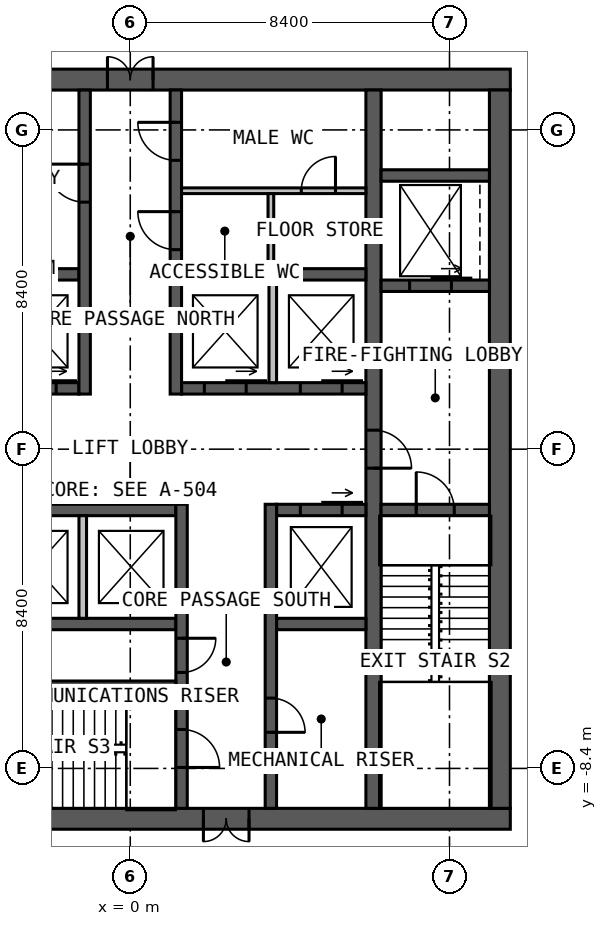
"""IFC4 building model, lengths in metres.
Left out: names, types, materials, properties, quantities, classifications, styles, units other than length and angle.
Written with IfcOpenShell. Run it as: python <this file> out.ifc"""

import sys

from ifc_helpers import new_model, si_unit, direction, frame, frame_2d, origin, place, context, subcontext, project, spatial, rectangle, extrude, element, fill, save


model = new_model("IFC4")
c1 = context("Model", 3, precision=1e-05, world=origin(), true_north=direction((0.0, 1.0)))
c2 = subcontext(c1, "Body", "Model", "MODEL_VIEW")
j1 = project(units=[si_unit("LENGTHUNIT", "METRE"), si_unit("PLANEANGLEUNIT", "RADIAN")], contexts=[c1])
p1 = place(None, origin())
s1 = spatial("IfcSite", under=j1, at=p1, CompositionType="ELEMENT")
p2 = place(p1, origin())
s2 = spatial("IfcBuilding", under=s1, at=p2, CompositionType="ELEMENT")
p3 = place(p2, frame((0.0, 0.0, 146.0)))
s3 = spatial("IfcBuildingStorey", under=s2, at=p3, CompositionType="ELEMENT", Elevation=146.0)
p4 = place(p3, frame((-10.0, 9.725, 0.0), z_axis=(0.0, 0.0, 1.0), x_axis=(1.0, 0.0, 0.0)))
e1 = element("IfcWall", 1, at=p4, inside=s3, PredefinedType="SOLIDWALL", context=c2, shape_type="SweptSolid", body=[
    extrude(rectangle(XDim=20.0, YDim=0.55, at=frame_2d((10.0, 0.0))), origin(), (0.0, 0.0, 1.0), 4.0),
])
p5 = place(p4, frame((9.4, 0.0, 0.0)))
e2 = element("IfcOpeningElement", 2, at=p5, cuts=e1, PredefinedType="OPENING", context=c2, shape_type="SweptSolid", body=[
    extrude(rectangle(XDim=1.2, YDim=2.2, at=frame_2d((0.6, 1.1))), frame((0.0, 0.285, 0.0), z_axis=(0.0, -1.0, 0.0), x_axis=(1.0, 0.0, 0.0)), (0.0, 0.0, 1.0), 0.57),
])
p6 = place(p3, frame((10.0, -9.725, 0.0), z_axis=(0.0, 0.0, 1.0), x_axis=(-1.0, 0.0, 0.0)))
e3 = element("IfcWall", 3, at=p6, inside=s3, PredefinedType="SOLIDWALL", context=c2, shape_type="SweptSolid", body=[
    extrude(rectangle(XDim=20.0, YDim=0.55, at=frame_2d((10.0, 0.0))), origin(), (0.0, 0.0, 1.0), 4.0),
])
p7 = place(p6, frame((6.875, 0.0, 0.0)))
e4 = element("IfcOpeningElement", 4, at=p7, cuts=e3, PredefinedType="OPENING", context=c2, shape_type="SweptSolid", body=[
    extrude(rectangle(XDim=1.2, YDim=2.2, at=frame_2d((0.6, 1.1))), frame((0.0, 0.285, 0.0), z_axis=(0.0, -1.0, 0.0), x_axis=(1.0, 0.0, 0.0)), (0.0, 0.0, 1.0), 0.57),
])
p8 = place(p3, frame((9.725, -9.45, 0.0), z_axis=(0.0, 0.0, 1.0), x_axis=(0.0, 1.0, 0.0)))
e5 = element("IfcWall", 5, at=p8, inside=s3, PredefinedType="SOLIDWALL", context=c2, shape_type="SweptSolid", body=[
    extrude(rectangle(XDim=18.9, YDim=0.55, at=frame_2d((9.45, 0.0))), origin(), (0.0, 0.0, 1.0), 4.0),
])
p9 = place(p3, frame((6.4, 9.45, 0.0), z_axis=(0.0, 0.0, 1.0), x_axis=(0.0, -1.0, 0.0)))
e6 = element("IfcWall", 6, at=p9, inside=s3, PredefinedType="SOLIDWALL", context=c2, shape_type="SweptSolid", body=[
    extrude(rectangle(XDim=18.9, YDim=0.4, at=frame_2d((9.45, 0.0))), origin(), (0.0, 0.0, 1.0), 4.0),
])
p10 = place(p9, frame((8.95, 0.0, 0.0)))
e7 = element("IfcOpeningElement", 7, at=p10, cuts=e6, PredefinedType="OPENING", context=c2, shape_type="SweptSolid", body=[
    extrude(rectangle(XDim=1.0, YDim=2.2, at=frame_2d((0.5, 1.1))), frame((0.0, 0.21, 0.0), z_axis=(0.0, -1.0, 0.0), x_axis=(1.0, 0.0, 0.0)), (0.0, 0.0, 1.0), 0.42),
])
p11 = place(p3, frame((-6.2, 1.6, 0.0), z_axis=(0.0, 0.0, 1.0), x_axis=(1.0, 0.0, 0.0)))
e8 = element("IfcWall", 8, at=p11, inside=s3, PredefinedType="SOLIDWALL", context=c2, shape_type="SweptSolid", body=[
    extrude(rectangle(XDim=4.85, YDim=0.3, at=frame_2d((2.425, 0.0))), origin(), (0.0, 0.0, 1.0), 4.0),
])
p12 = place(p11, frame((0.625, 0.0, 0.0)))
e9 = element("IfcOpeningElement", 9, at=p12, cuts=e8, PredefinedType="OPENING", context=c2, shape_type="SweptSolid", body=[
    extrude(rectangle(XDim=1.1, YDim=2.2, at=frame_2d((0.55, 1.1))), frame((0.0, 0.16, 0.0), z_axis=(0.0, -1.0, 0.0), x_axis=(1.0, 0.0, 0.0)), (0.0, 0.0, 1.0), 0.32),
])
p13 = place(p11, frame((3.15, 0.0, 0.0)))
e10 = element("IfcOpeningElement", 10, at=p13, cuts=e8, PredefinedType="OPENING", context=c2, shape_type="SweptSolid", body=[
    extrude(rectangle(XDim=1.1, YDim=2.2, at=frame_2d((0.55, 1.1))), frame((0.0, 0.16, 0.0), z_axis=(0.0, -1.0, 0.0), x_axis=(1.0, 0.0, 0.0)), (0.0, 0.0, 1.0), 0.32),
])
p14 = place(p3, frame((1.35, 1.6, 0.0), z_axis=(0.0, 0.0, 1.0), x_axis=(1.0, 0.0, 0.0)))
e11 = element("IfcWall", 11, at=p14, inside=s3, PredefinedType="SOLIDWALL", context=c2, shape_type="SweptSolid", body=[
    extrude(rectangle(XDim=4.85, YDim=0.3, at=frame_2d((2.425, 0.0))), origin(), (0.0, 0.0, 1.0), 4.0),
])
p15 = place(p14, frame((0.6, 0.0, 0.0)))
e12 = element("IfcOpeningElement", 12, at=p15, cuts=e11, PredefinedType="OPENING", context=c2, shape_type="SweptSolid", body=[
    extrude(rectangle(XDim=1.1, YDim=2.2, at=frame_2d((0.55, 1.1))), frame((0.0, 0.16, 0.0), z_axis=(0.0, -1.0, 0.0), x_axis=(1.0, 0.0, 0.0)), (0.0, 0.0, 1.0), 0.32),
])
p16 = place(p14, frame((3.125, 0.0, 0.0)))
e13 = element("IfcOpeningElement", 13, at=p16, cuts=e11, PredefinedType="OPENING", context=c2, shape_type="SweptSolid", body=[
    extrude(rectangle(XDim=1.1, YDim=2.2, at=frame_2d((0.55, 1.1))), frame((0.0, 0.16, 0.0), z_axis=(0.0, -1.0, 0.0), x_axis=(1.0, 0.0, 0.0)), (0.0, 0.0, 1.0), 0.32),
])
for number, where, z_axis, x_axis in (
    (14, (-6.2, 4.6, 0.0), (0.0, 0.0, 1.0), (1.0, 0.0, 0.0)),
    (15, (1.35, 4.6, 0.0), (0.0, 0.0, 1.0), (1.0, 0.0, 0.0)),
):
    element("IfcWall", number, at=place(p3, frame(where, z_axis=z_axis, x_axis=x_axis)), inside=s3, PredefinedType="SOLIDWALL", context=c2, shape_type="SweptSolid", body=[
        extrude(rectangle(XDim=4.85, YDim=0.3, at=frame_2d((2.425, 0.0))), origin(), (0.0, 0.0, 1.0), 4.0),
    ])
p17 = place(p3, frame((-1.2, 1.45, 0.0), z_axis=(0.0, 0.0, 1.0), x_axis=(0.0, 1.0, 0.0)))
e16 = element("IfcWall", 16, at=p17, inside=s3, PredefinedType="SOLIDWALL", context=c2, shape_type="SweptSolid", body=[
    extrude(rectangle(XDim=8.0, YDim=0.3, at=frame_2d((4.0, 0.0))), origin(), (0.0, 0.0, 1.0), 4.0),
])
p18 = place(p17, frame((5.05, 0.0, 0.0)))
e17 = element("IfcOpeningElement", 17, at=p18, cuts=e16, PredefinedType="OPENING", context=c2, shape_type="SweptSolid", body=[
    extrude(rectangle(XDim=1.0, YDim=2.2, at=frame_2d((0.5, 1.1))), frame((0.0, 0.16, 0.0), z_axis=(0.0, -1.0, 0.0), x_axis=(1.0, 0.0, 0.0)), (0.0, 0.0, 1.0), 0.32),
])
p19 = place(p3, frame((1.2, 1.45, 0.0), z_axis=(0.0, 0.0, 1.0), x_axis=(0.0, 1.0, 0.0)))
e18 = element("IfcWall", 18, at=p19, inside=s3, PredefinedType="SOLIDWALL", context=c2, shape_type="SweptSolid", body=[
    extrude(rectangle(XDim=8.0, YDim=0.3, at=frame_2d((4.0, 0.0))), origin(), (0.0, 0.0, 1.0), 4.0),
])
p20 = place(p19, frame((3.8, 0.0, 0.0)))
e19 = element("IfcOpeningElement", 19, at=p20, cuts=e18, PredefinedType="OPENING", context=c2, shape_type="SweptSolid", body=[
    extrude(rectangle(XDim=1.0, YDim=2.2, at=frame_2d((0.5, 1.1))), frame((0.0, 0.16, 0.0), z_axis=(0.0, -1.0, 0.0), x_axis=(1.0, 0.0, 0.0)), (0.0, 0.0, 1.0), 0.32),
])
p21 = place(p19, frame((6.15, 0.0, 0.0)))
e20 = element("IfcOpeningElement", 20, at=p21, cuts=e18, PredefinedType="OPENING", context=c2, shape_type="SweptSolid", body=[
    extrude(rectangle(XDim=1.0, YDim=2.2, at=frame_2d((0.5, 1.1))), frame((0.0, 0.16, 0.0), z_axis=(0.0, -1.0, 0.0), x_axis=(1.0, 0.0, 0.0)), (0.0, 0.0, 1.0), 0.32),
])
p22 = place(p3, frame((-6.2, -1.6, 0.0), z_axis=(0.0, 0.0, 1.0), x_axis=(1.0, 0.0, 0.0)))
e21 = element("IfcWall", 21, at=p22, inside=s3, PredefinedType="SOLIDWALL", context=c2, shape_type="SweptSolid", body=[
    extrude(rectangle(XDim=7.4, YDim=0.3, at=frame_2d((3.7, 0.0))), origin(), (0.0, 0.0, 1.0), 4.0),
])
p23 = place(p3, frame((3.85, -1.6, 0.0), z_axis=(0.0, 0.0, 1.0), x_axis=(1.0, 0.0, 0.0)))
e22 = element("IfcWall", 22, at=p23, inside=s3, PredefinedType="SOLIDWALL", context=c2, shape_type="SweptSolid", body=[
    extrude(rectangle(XDim=2.35, YDim=0.3, at=frame_2d((1.175, 0.0))), origin(), (0.0, 0.0, 1.0), 4.0),
])
p24 = place(p23, frame((0.625, 0.0, 0.0)))
e23 = element("IfcOpeningElement", 23, at=p24, cuts=e22, PredefinedType="OPENING", context=c2, shape_type="SweptSolid", body=[
    extrude(rectangle(XDim=1.1, YDim=2.2, at=frame_2d((0.55, 1.1))), frame((0.0, 0.16, 0.0), z_axis=(0.0, -1.0, 0.0), x_axis=(1.0, 0.0, 0.0)), (0.0, 0.0, 1.0), 0.32),
])
p25 = place(p3, frame((-6.2, -4.6, 0.0), z_axis=(0.0, 0.0, 1.0), x_axis=(1.0, 0.0, 0.0)))
e24 = element("IfcWall", 24, at=p25, inside=s3, PredefinedType="SOLIDWALL", context=c2, shape_type="SweptSolid", body=[
    extrude(rectangle(XDim=7.4, YDim=0.3, at=frame_2d((3.7, 0.0))), origin(), (0.0, 0.0, 1.0), 4.0),
])
p26 = place(p3, frame((3.85, -4.6, 0.0), z_axis=(0.0, 0.0, 1.0), x_axis=(1.0, 0.0, 0.0)))
e25 = element("IfcWall", 25, at=p26, inside=s3, PredefinedType="SOLIDWALL", context=c2, shape_type="SweptSolid", body=[
    extrude(rectangle(XDim=2.35, YDim=0.3, at=frame_2d((1.175, 0.0))), origin(), (0.0, 0.0, 1.0), 4.0),
])
p27 = place(p3, frame((1.35, -1.45, 0.0), z_axis=(0.0, 0.0, 1.0), x_axis=(0.0, -1.0, 0.0)))
e26 = element("IfcWall", 26, at=p27, inside=s3, PredefinedType="SOLIDWALL", context=c2, shape_type="SweptSolid", body=[
    extrude(rectangle(XDim=8.0, YDim=0.3, at=frame_2d((4.0, 0.0))), origin(), (0.0, 0.0, 1.0), 4.0),
])
p28 = place(p27, frame((5.925, 0.0, 0.0)))
e27 = element("IfcOpeningElement", 27, at=p28, cuts=e26, PredefinedType="OPENING", context=c2, shape_type="SweptSolid", body=[
    extrude(rectangle(XDim=1.0, YDim=2.2, at=frame_2d((0.5, 1.1))), frame((0.0, 0.16, 0.0), z_axis=(0.0, -1.0, 0.0), x_axis=(1.0, 0.0, 0.0)), (0.0, 0.0, 1.0), 0.32),
])
p29 = place(p27, frame((3.525, 0.0, 0.0)))
e28 = element("IfcOpeningElement", 28, at=p29, cuts=e26, PredefinedType="OPENING", context=c2, shape_type="SweptSolid", body=[
    extrude(rectangle(XDim=0.9, YDim=2.2, at=frame_2d((0.45, 1.1))), frame((0.0, 0.16, 0.0), z_axis=(0.0, -1.0, 0.0), x_axis=(1.0, 0.0, 0.0)), (0.0, 0.0, 1.0), 0.32),
])
p30 = place(p3, frame((3.7, -1.45, 0.0), z_axis=(0.0, 0.0, 1.0), x_axis=(0.0, -1.0, 0.0)))
e29 = element("IfcWall", 29, at=p30, inside=s3, PredefinedType="SOLIDWALL", context=c2, shape_type="SweptSolid", body=[
    extrude(rectangle(XDim=8.0, YDim=0.3, at=frame_2d((4.0, 0.0))), origin(), (0.0, 0.0, 1.0), 4.0),
])
p31 = place(p30, frame((5.1, 0.0, 0.0)))
e30 = element("IfcOpeningElement", 30, at=p31, cuts=e29, PredefinedType="OPENING", context=c2, shape_type="SweptSolid", body=[
    extrude(rectangle(XDim=0.9, YDim=2.2, at=frame_2d((0.45, 1.1))), frame((0.0, 0.16, 0.0), z_axis=(0.0, -1.0, 0.0), x_axis=(1.0, 0.0, 0.0)), (0.0, 0.0, 1.0), 0.32),
])
p32 = place(p3, frame((-6.2, -6.2, 0.0), z_axis=(0.0, 0.0, 1.0), x_axis=(1.0, 0.0, 0.0)))
e31 = element("IfcWall", 31, at=p32, inside=s3, PredefinedType="SOLIDWALL", context=c2, shape_type="SweptSolid", body=[
    extrude(rectangle(XDim=7.4, YDim=0.2, at=frame_2d((3.7, 0.0))), origin(), (0.0, 0.0, 1.0), 4.0),
])
p33 = place(p3, frame((6.6, -1.6, 0.0), z_axis=(0.0, 0.0, 1.0), x_axis=(1.0, 0.0, 0.0)))
e32 = element("IfcWall", 32, at=p33, inside=s3, PredefinedType="SOLIDWALL", context=c2, shape_type="SweptSolid", body=[
    extrude(rectangle(XDim=2.85, YDim=0.3, at=frame_2d((1.425, 0.0))), origin(), (0.0, 0.0, 1.0), 4.0),
])
p34 = place(p33, frame((0.925, 0.0, 0.0)))
e33 = element("IfcOpeningElement", 33, at=p34, cuts=e32, PredefinedType="OPENING", context=c2, shape_type="SweptSolid", body=[
    extrude(rectangle(XDim=1.0, YDim=2.2, at=frame_2d((0.5, 1.1))), frame((0.0, 0.16, 0.0), z_axis=(0.0, -1.0, 0.0), x_axis=(1.0, 0.0, 0.0)), (0.0, 0.0, 1.0), 0.32),
])
p35 = place(p3, frame((6.6, 4.3, 0.0), z_axis=(0.0, 0.0, 1.0), x_axis=(1.0, 0.0, 0.0)))
e34 = element("IfcWall", 34, at=p35, inside=s3, PredefinedType="SOLIDWALL", context=c2, shape_type="SweptSolid", body=[
    extrude(rectangle(XDim=2.85, YDim=0.3, at=frame_2d((1.425, 0.0))), origin(), (0.0, 0.0, 1.0), 4.0),
])
p36 = place(p35, frame((0.75, 0.0, 0.0)))
e35 = element("IfcOpeningElement", 35, at=p36, cuts=e34, PredefinedType="OPENING", context=c2, shape_type="SweptSolid", body=[
    extrude(rectangle(XDim=1.1, YDim=2.2, at=frame_2d((0.55, 1.1))), frame((0.0, 0.16, 0.0), z_axis=(0.0, -1.0, 0.0), x_axis=(1.0, 0.0, 0.0)), (0.0, 0.0, 1.0), 0.32),
])
p37 = place(p3, frame((6.6, 7.2, 0.0), z_axis=(0.0, 0.0, 1.0), x_axis=(1.0, 0.0, 0.0)))
e36 = element("IfcWall", 36, at=p37, inside=s3, PredefinedType="SOLIDWALL", context=c2, shape_type="SweptSolid", body=[
    extrude(rectangle(XDim=2.85, YDim=0.3, at=frame_2d((1.425, 0.0))), origin(), (0.0, 0.0, 1.0), 4.0),
])
for number, where, z_axis, x_axis in (
    (37, (3.75, 1.75, 0.0), (0.0, 0.0, 1.0), (0.0, 1.0, 0.0)),
    (38, (-1.25, -1.75, 0.0), (0.0, 0.0, 1.0), (0.0, -1.0, 0.0)),
):
    element("IfcWall", number, at=place(p3, frame(where, z_axis=z_axis, x_axis=x_axis)), inside=s3, PredefinedType="SOLIDWALL", context=c2, shape_type="SweptSolid", body=[
        extrude(rectangle(XDim=2.7, YDim=0.2, at=frame_2d((1.35, 0.0))), origin(), (0.0, 0.0, 1.0), 3.75),
    ])
p38 = place(p3, frame((1.35, 6.8, 0.0), z_axis=(0.0, 0.0, 1.0), x_axis=(1.0, 0.0, 0.0)))
e39 = element("IfcWall", 39, at=p38, inside=s3, PredefinedType="PARTITIONING", context=c2, shape_type="SweptSolid", body=[
    extrude(rectangle(XDim=4.85, YDim=0.15, at=frame_2d((2.425, 0.0))), origin(), (0.0, 0.0, 1.0), 3.75),
])
p39 = place(p38, frame((3.15, 0.0, 0.0)))
e40 = element("IfcOpeningElement", 40, at=p39, cuts=e39, PredefinedType="OPENING", context=c2, shape_type="SweptSolid", body=[
    extrude(rectangle(XDim=0.9, YDim=2.2, at=frame_2d((0.45, 1.1))), frame((0.0, 0.085, 0.0), z_axis=(0.0, -1.0, 0.0), x_axis=(1.0, 0.0, 0.0)), (0.0, 0.0, 1.0), 0.17),
])
p40 = place(p3, frame((3.7, 4.75, 0.0), z_axis=(0.0, 0.0, 1.0), x_axis=(0.0, 1.0, 0.0)))
e41 = element("IfcWall", 41, at=p40, inside=s3, PredefinedType="PARTITIONING", context=c2, shape_type="SweptSolid", body=[
    extrude(rectangle(XDim=1.975, YDim=0.15, at=frame_2d((0.988, 0.0))), origin(), (0.0, 0.0, 1.0), 3.75),
])
p41 = place(p5, origin())
e42 = element("IfcDoor", 42, at=p41, inside=s3, OperationType="DOUBLE_DOOR_SINGLE_SWING", PredefinedType="DOOR", context=c2, shape_type="SweptSolid", body=[
    extrude(rectangle(XDim=1.2, YDim=2.2, at=frame_2d((0.6, 1.1))), frame((0.0, 0.025, 0.0), z_axis=(0.0, -1.0, 0.0), x_axis=(1.0, 0.0, 0.0)), (0.0, 0.0, 1.0), 0.05),
])
fill(e2, e42)
p42 = place(p7, origin())
e43 = element("IfcDoor", 43, at=p42, inside=s3, OperationType="DOUBLE_DOOR_SINGLE_SWING", PredefinedType="DOOR", context=c2, shape_type="SweptSolid", body=[
    extrude(rectangle(XDim=1.2, YDim=2.2, at=frame_2d((0.6, 1.1))), frame((0.0, 0.025, 0.0), z_axis=(0.0, -1.0, 0.0), x_axis=(1.0, 0.0, 0.0)), (0.0, 0.0, 1.0), 0.05),
])
fill(e4, e43)
p43 = place(p10, origin())
e44 = element("IfcDoor", 44, at=p43, inside=s3, OperationType="SINGLE_SWING_RIGHT", PredefinedType="DOOR", context=c2, shape_type="SweptSolid", body=[
    extrude(rectangle(XDim=1.0, YDim=2.2, at=frame_2d((0.5, 1.1))), frame((0.0, 0.025, 0.0), z_axis=(0.0, -1.0, 0.0), x_axis=(1.0, 0.0, 0.0)), (0.0, 0.0, 1.0), 0.05),
])
fill(e7, e44)
p44 = place(p34, origin())
e45 = element("IfcDoor", 45, at=p44, inside=s3, OperationType="SINGLE_SWING_LEFT", PredefinedType="DOOR", context=c2, shape_type="SweptSolid", body=[
    extrude(rectangle(XDim=1.0, YDim=2.2, at=frame_2d((0.5, 1.1))), frame((0.0, 0.025, 0.0), z_axis=(0.0, -1.0, 0.0), x_axis=(1.0, 0.0, 0.0)), (0.0, 0.0, 1.0), 0.05),
])
fill(e33, e45)
p45 = place(p28, origin())
e46 = element("IfcDoor", 46, at=p45, inside=s3, OperationType="SINGLE_SWING_RIGHT", PredefinedType="DOOR", context=c2, shape_type="SweptSolid", body=[
    extrude(rectangle(XDim=1.0, YDim=2.2, at=frame_2d((0.5, 1.1))), frame((0.0, 0.025, 0.0), z_axis=(0.0, -1.0, 0.0), x_axis=(1.0, 0.0, 0.0)), (0.0, 0.0, 1.0), 0.05),
])
fill(e27, e46)
p46 = place(p18, origin())
e47 = element("IfcDoor", 47, at=p46, inside=s3, OperationType="SINGLE_SWING_RIGHT", PredefinedType="DOOR", context=c2, shape_type="SweptSolid", body=[
    extrude(rectangle(XDim=1.0, YDim=2.2, at=frame_2d((0.5, 1.1))), frame((0.0, 0.025, 0.0), z_axis=(0.0, -1.0, 0.0), x_axis=(1.0, 0.0, 0.0)), (0.0, 0.0, 1.0), 0.05),
])
fill(e17, e47)
p47 = place(p20, origin())
e48 = element("IfcDoor", 48, at=p47, inside=s3, OperationType="SINGLE_SWING_RIGHT", PredefinedType="DOOR", context=c2, shape_type="SweptSolid", body=[
    extrude(rectangle(XDim=1.0, YDim=2.2, at=frame_2d((0.5, 1.1))), frame((0.0, 0.025, 0.0), z_axis=(0.0, -1.0, 0.0), x_axis=(1.0, 0.0, 0.0)), (0.0, 0.0, 1.0), 0.05),
])
fill(e19, e48)
p48 = place(p21, origin())
e49 = element("IfcDoor", 49, at=p48, inside=s3, OperationType="SINGLE_SWING_RIGHT", PredefinedType="DOOR", context=c2, shape_type="SweptSolid", body=[
    extrude(rectangle(XDim=1.0, YDim=2.2, at=frame_2d((0.5, 1.1))), frame((0.0, 0.025, 0.0), z_axis=(0.0, -1.0, 0.0), x_axis=(1.0, 0.0, 0.0)), (0.0, 0.0, 1.0), 0.05),
])
fill(e20, e49)
p49 = place(p29, origin())
e50 = element("IfcDoor", 50, at=p49, inside=s3, OperationType="SINGLE_SWING_LEFT", PredefinedType="DOOR", context=c2, shape_type="SweptSolid", body=[
    extrude(rectangle(XDim=0.9, YDim=2.2, at=frame_2d((0.45, 1.1))), frame((0.0, 0.025, 0.0), z_axis=(0.0, -1.0, 0.0), x_axis=(1.0, 0.0, 0.0)), (0.0, 0.0, 1.0), 0.05),
])
fill(e28, e50)
p50 = place(p31, origin())
e51 = element("IfcDoor", 51, at=p50, inside=s3, OperationType="SINGLE_SWING_RIGHT", PredefinedType="DOOR", context=c2, shape_type="SweptSolid", body=[
    extrude(rectangle(XDim=0.9, YDim=2.2, at=frame_2d((0.45, 1.1))), frame((0.0, 0.025, 0.0), z_axis=(0.0, -1.0, 0.0), x_axis=(1.0, 0.0, 0.0)), (0.0, 0.0, 1.0), 0.05),
])
fill(e30, e51)
p51 = place(p39, origin())
e52 = element("IfcDoor", 52, at=p51, inside=s3, OperationType="SINGLE_SWING_RIGHT", PredefinedType="DOOR", context=c2, shape_type="SweptSolid", body=[
    extrude(rectangle(XDim=0.9, YDim=2.2, at=frame_2d((0.45, 1.1))), frame((0.0, 0.025, 0.0), z_axis=(0.0, -1.0, 0.0), x_axis=(1.0, 0.0, 0.0)), (0.0, 0.0, 1.0), 0.05),
])
fill(e40, e52)
p52 = place(p13, origin())
e53 = element("IfcDoor", 53, at=p52, inside=s3, OperationType="SLIDING_TO_LEFT", PredefinedType="DOOR", context=c2, shape_type="SweptSolid", body=[
    extrude(rectangle(XDim=1.1, YDim=2.2, at=frame_2d((0.55, 1.1))), frame((0.0, 0.025, 0.0), z_axis=(0.0, -1.0, 0.0), x_axis=(1.0, 0.0, 0.0)), (0.0, 0.0, 1.0), 0.05),
])
fill(e10, e53)
p53 = place(p15, origin())
e54 = element("IfcDoor", 54, at=p53, inside=s3, OperationType="SLIDING_TO_LEFT", PredefinedType="DOOR", context=c2, shape_type="SweptSolid", body=[
    extrude(rectangle(XDim=1.1, YDim=2.2, at=frame_2d((0.55, 1.1))), frame((0.0, 0.025, 0.0), z_axis=(0.0, -1.0, 0.0), x_axis=(1.0, 0.0, 0.0)), (0.0, 0.0, 1.0), 0.05),
])
fill(e12, e54)
p54 = place(p16, origin())
e55 = element("IfcDoor", 55, at=p54, inside=s3, OperationType="SLIDING_TO_LEFT", PredefinedType="DOOR", context=c2, shape_type="SweptSolid", body=[
    extrude(rectangle(XDim=1.1, YDim=2.2, at=frame_2d((0.55, 1.1))), frame((0.0, 0.025, 0.0), z_axis=(0.0, -1.0, 0.0), x_axis=(1.0, 0.0, 0.0)), (0.0, 0.0, 1.0), 0.05),
])
fill(e13, e55)
p55 = place(p24, origin())
e56 = element("IfcDoor", 56, at=p55, inside=s3, OperationType="SLIDING_TO_LEFT", PredefinedType="DOOR", context=c2, shape_type="SweptSolid", body=[
    extrude(rectangle(XDim=1.1, YDim=2.2, at=frame_2d((0.55, 1.1))), frame((0.0, 0.025, 0.0), z_axis=(0.0, -1.0, 0.0), x_axis=(1.0, 0.0, 0.0)), (0.0, 0.0, 1.0), 0.05),
])
fill(e23, e56)
p56 = place(p36, origin())
e57 = element("IfcDoor", 57, at=p56, inside=s3, OperationType="SLIDING_TO_LEFT", PredefinedType="DOOR", context=c2, shape_type="SweptSolid", body=[
    extrude(rectangle(XDim=1.1, YDim=2.2, at=frame_2d((0.55, 1.1))), frame((0.0, 0.025, 0.0), z_axis=(0.0, -1.0, 0.0), x_axis=(1.0, 0.0, 0.0)), (0.0, 0.0, 1.0), 0.05),
])
fill(e35, e57)
save(model, sys.argv[1])
